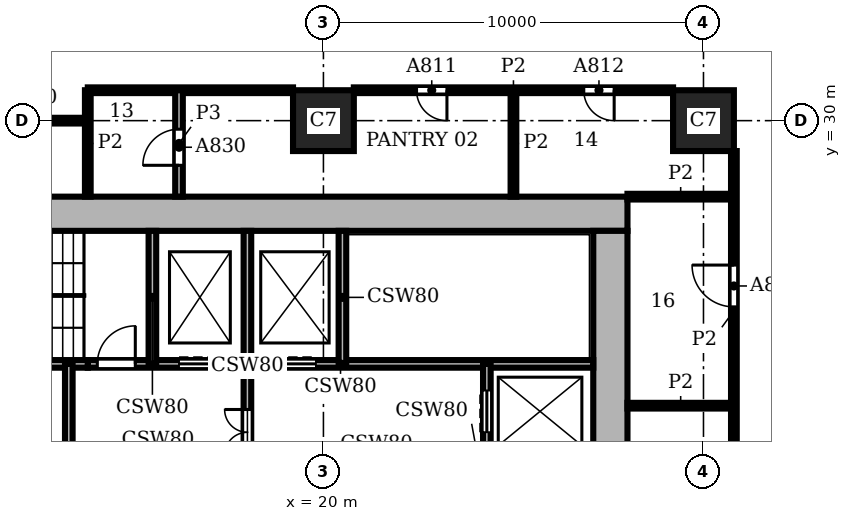
"""IFC4 building model, lengths in metres.
Left out: names, types, materials, properties, quantities, classifications, styles, units other than length and angle.
Written with IfcOpenShell. Run it as: python <this file> out.ifc"""

import sys

from ifc_helpers import new_model, si_unit, direction, frame, frame_2d, origin, origin_2d, place, context, subcontext, project, spatial, rectangle, extrude, element, fill, save


model = new_model("IFC4")
c1 = context("Model", 3, precision=1e-05, world=origin(), true_north=direction((0.0, 1.0)))
c2 = subcontext(c1, "Body", "Model", "MODEL_VIEW")
j1 = project(units=[si_unit("LENGTHUNIT", "METRE"), si_unit("PLANEANGLEUNIT", "RADIAN")], contexts=[c1])
p1 = place(None, origin())
s1 = spatial("IfcSite", under=j1, at=p1, CompositionType="ELEMENT")
p2 = place(p1, origin())
s2 = spatial("IfcBuilding", under=s1, at=p2, CompositionType="ELEMENT")
p3 = place(p2, frame((0.0, 0.0, 93.9)))
s3 = spatial("IfcBuildingStorey", under=s2, at=p3, CompositionType="ELEMENT", Elevation=93.9)
for number, where, z_axis, x_axis in (
    (1, (20.0, 30.0, 0.0), (0.0, 0.0, 1.0), (1.0, 0.0, 0.0)),
    (2, (30.0, 30.0, 0.0), (0.0, 0.0, 1.0), (1.0, 0.0, 0.0)),
):
    element("IfcColumn", number, at=place(p3, frame(where, z_axis=z_axis, x_axis=x_axis)), inside=s3, PredefinedType="COLUMN", context=c2, shape_type="SweptSolid", body=[
        extrude(rectangle(XDim=1.6, YDim=1.6, at=origin_2d()), origin(), (0.0, 0.0, 1.0), 3.9),
    ])
p4 = place(p3, frame((27.55, 8.9, 0.0), z_axis=(0.0, 0.0, 1.0), x_axis=(0.0, 1.0, 0.0)))
e3 = element("IfcWall", 3, at=p4, inside=s3, PredefinedType="SHEAR", context=c2, shape_type="SweptSolid", body=[
    extrude(rectangle(XDim=18.2, YDim=0.9, at=frame_2d((9.1, 0.0))), origin(), (0.0, 0.0, 1.0), 3.9),
])
p5 = place(p4, frame((4.55, 0.0, 0.0)))
e4 = element("IfcOpeningElement", 4, at=p5, cuts=e3, PredefinedType="OPENING", context=c2, shape_type="SweptSolid", body=[
    extrude(rectangle(XDim=1.6, YDim=2.1, at=frame_2d((0.8, 1.05))), frame((0.0, 0.46, 0.0), z_axis=(0.0, -1.0, 0.0), x_axis=(1.0, 0.0, 0.0)), (0.0, 0.0, 1.0), 0.92),
])
p6 = place(p3, frame((28.0, 27.55, 0.0), z_axis=(0.0, 0.0, 1.0), x_axis=(-1.0, 0.0, 0.0)))
e5 = element("IfcWall", 5, at=p6, inside=s3, PredefinedType="SHEAR", context=c2, shape_type="SweptSolid", body=[
    extrude(rectangle(XDim=20.0, YDim=0.9, at=frame_2d((10.0, 0.0))), origin(), (0.0, 0.0, 1.0), 3.9),
])
p7 = place(p3, frame((8.9, 23.6, 0.0), z_axis=(0.0, 0.0, 1.0), x_axis=(1.0, 0.0, 0.0)))
e6 = element("IfcWall", 6, at=p7, inside=s3, PredefinedType="SHEAR", context=c2, shape_type="SweptSolid", body=[
    extrude(rectangle(XDim=4.9, YDim=0.2, at=frame_2d((2.45, 0.0))), origin(), (0.0, 0.0, 1.0), 3.58),
])
p8 = place(p3, frame((13.8, 23.6, 0.0), z_axis=(0.0, 0.0, 1.0), x_axis=(1.0, 0.0, 0.0)))
e7 = element("IfcWall", 7, at=p8, inside=s3, PredefinedType="SHEAR", context=c2, shape_type="SweptSolid", body=[
    extrude(rectangle(XDim=13.3, YDim=0.2, at=frame_2d((6.65, 0.0))), origin(), (0.0, 0.0, 1.0), 3.58),
])
p9 = place(p8, frame((2.4, 0.0, 0.0)))
e8 = element("IfcOpeningElement", 8, at=p9, cuts=e7, PredefinedType="OPENING", context=c2, shape_type="SweptSolid", body=[
    extrude(rectangle(XDim=1.1, YDim=2.1, at=frame_2d((0.55, 1.05))), frame((0.0, 0.11, 0.0), z_axis=(0.0, -1.0, 0.0), x_axis=(1.0, 0.0, 0.0)), (0.0, 0.0, 1.0), 0.22),
])
p10 = place(p8, frame((4.9, 0.0, 0.0)))
e9 = element("IfcOpeningElement", 9, at=p10, cuts=e7, PredefinedType="OPENING", context=c2, shape_type="SweptSolid", body=[
    extrude(rectangle(XDim=1.1, YDim=2.1, at=frame_2d((0.55, 1.05))), frame((0.0, 0.11, 0.0), z_axis=(0.0, -1.0, 0.0), x_axis=(1.0, 0.0, 0.0)), (0.0, 0.0, 1.0), 0.22),
])
p11 = place(p8, frame((0.25, 0.0, 0.0)))
e10 = element("IfcOpeningElement", 10, at=p11, cuts=e7, PredefinedType="OPENING", context=c2, shape_type="SweptSolid", body=[
    extrude(rectangle(XDim=1.0, YDim=2.1, at=frame_2d((0.5, 1.05))), frame((0.0, 0.11, 0.0), z_axis=(0.0, -1.0, 0.0), x_axis=(1.0, 0.0, 0.0)), (0.0, 0.0, 1.0), 0.22),
])
p12 = place(p3, frame((13.3, 20.0, 0.0), z_axis=(0.0, 0.0, 1.0), x_axis=(0.0, 1.0, 0.0)))
e11 = element("IfcWall", 11, at=p12, inside=s3, PredefinedType="SHEAR", context=c2, shape_type="SweptSolid", body=[
    extrude(rectangle(XDim=3.6, YDim=0.2, at=frame_2d((1.8, 0.0))), origin(), (0.0, 0.0, 1.0), 3.58),
])
p13 = place(p3, frame((15.5, 23.6, 0.0), z_axis=(0.0, 0.0, 1.0), x_axis=(0.0, 1.0, 0.0)))
e12 = element("IfcWall", 12, at=p13, inside=s3, PredefinedType="SHEAR", context=c2, shape_type="SweptSolid", body=[
    extrude(rectangle(XDim=3.5, YDim=0.2, at=frame_2d((1.75, 0.0))), origin(), (0.0, 0.0, 1.0), 3.58),
])
p14 = place(p3, frame((18.0, 20.0, 0.0), z_axis=(0.0, 0.0, 1.0), x_axis=(0.0, 1.0, 0.0)))
e13 = element("IfcWall", 13, at=p14, inside=s3, PredefinedType="SHEAR", context=c2, shape_type="SweptSolid", body=[
    extrude(rectangle(XDim=7.1, YDim=0.2, at=frame_2d((3.55, 0.0))), origin(), (0.0, 0.0, 1.0), 3.58),
])
p15 = place(p14, frame((1.2, 0.0, 0.0)))
e14 = element("IfcOpeningElement", 14, at=p15, cuts=e13, PredefinedType="OPENING", context=c2, shape_type="SweptSolid", body=[
    extrude(rectangle(XDim=1.2, YDim=2.1, at=frame_2d((0.6, 1.05))), frame((0.0, 0.11, 0.0), z_axis=(0.0, -1.0, 0.0), x_axis=(1.0, 0.0, 0.0)), (0.0, 0.0, 1.0), 0.22),
])
p16 = place(p3, frame((20.5, 23.6, 0.0), z_axis=(0.0, 0.0, 1.0), x_axis=(0.0, 1.0, 0.0)))
e15 = element("IfcWall", 15, at=p16, inside=s3, PredefinedType="SHEAR", context=c2, shape_type="SweptSolid", body=[
    extrude(rectangle(XDim=3.5, YDim=0.2, at=frame_2d((1.75, 0.0))), origin(), (0.0, 0.0, 1.0), 3.58),
])
p17 = place(p3, frame((24.3, 16.1, 0.0), z_axis=(0.0, 0.0, 1.0), x_axis=(0.0, 1.0, 0.0)))
e16 = element("IfcWall", 16, at=p17, inside=s3, PredefinedType="SHEAR", context=c2, shape_type="SweptSolid", body=[
    extrude(rectangle(XDim=7.5, YDim=0.2, at=frame_2d((3.75, 0.0))), origin(), (0.0, 0.0, 1.0), 3.58),
])
p18 = place(p17, frame((5.7, 0.0, 0.0)))
e17 = element("IfcOpeningElement", 17, at=p18, cuts=e16, PredefinedType="OPENING", context=c2, shape_type="SweptSolid", body=[
    extrude(rectangle(XDim=1.1, YDim=2.1, at=frame_2d((0.55, 1.05))), frame((0.0, 0.11, 0.0), z_axis=(0.0, -1.0, 0.0), x_axis=(1.0, 0.0, 0.0)), (0.0, 0.0, 1.0), 0.22),
])
for number, where, z_axis, x_axis in (
    (18, (13.8, 28.0, 0.0), (0.0, 0.0, 1.0), (0.0, 1.0, 0.0)),
    (19, (25.0, 28.0, 0.0), (0.0, 0.0, 1.0), (0.0, 1.0, 0.0)),
):
    element("IfcWall", number, at=place(p3, frame(where, z_axis=z_axis, x_axis=x_axis)), inside=s3, PredefinedType="PARTITIONING", context=c2, shape_type="SweptSolid", body=[
        extrude(rectangle(XDim=2.8, YDim=0.15, at=frame_2d((1.4, 0.0))), origin(), (0.0, 0.0, 1.0), 3.58),
    ])
p19 = place(p3, frame((30.8, 20.8, 0.0), z_axis=(0.0, 0.0, 1.0), x_axis=(0.0, 1.0, 0.0)))
e20 = element("IfcWall", 20, at=p19, inside=s3, PredefinedType="PARTITIONING", context=c2, shape_type="SweptSolid", body=[
    extrude(rectangle(XDim=8.4, YDim=0.15, at=frame_2d((4.2, 0.0))), origin(), (0.0, 0.0, 1.0), 3.58),
])
p20 = place(p19, frame((4.3, 0.0, 0.0)))
e21 = element("IfcOpeningElement", 21, at=p20, cuts=e20, PredefinedType="OPENING", context=c2, shape_type="SweptSolid", body=[
    extrude(rectangle(XDim=1.1, YDim=2.1, at=frame_2d((0.55, 1.05))), frame((0.0, 0.085, 0.0), z_axis=(0.0, -1.0, 0.0), x_axis=(1.0, 0.0, 0.0)), (0.0, 0.0, 1.0), 0.17),
])
for number, where, z_axis, x_axis in (
    (22, (28.0, 22.5, 0.0), (0.0, 0.0, 1.0), (1.0, 0.0, 0.0)),
    (23, (28.0, 28.0, 0.0), (0.0, 0.0, 1.0), (1.0, 0.0, 0.0)),
):
    element("IfcWall", number, at=place(p3, frame(where, z_axis=z_axis, x_axis=x_axis)), inside=s3, PredefinedType="PARTITIONING", context=c2, shape_type="SweptSolid", body=[
        extrude(rectangle(XDim=2.8, YDim=0.15, at=frame_2d((1.4, 0.0))), origin(), (0.0, 0.0, 1.0), 3.58),
    ])
p21 = place(p3, frame((10.8, 30.0, 0.0), z_axis=(0.0, 0.0, 1.0), x_axis=(1.0, 0.0, 0.0)))
e24 = element("IfcWall", 24, at=p21, inside=s3, PredefinedType="PARTITIONING", context=c2, shape_type="SweptSolid", body=[
    extrude(rectangle(XDim=3.0, YDim=0.15, at=frame_2d((1.5, 0.0))), origin(), (0.0, 0.0, 1.0), 3.58),
])
p22 = place(p21, frame((1.15, 0.0, 0.0)))
e25 = element("IfcOpeningElement", 25, at=p22, cuts=e24, PredefinedType="OPENING", context=c2, shape_type="SweptSolid", body=[
    extrude(rectangle(XDim=0.8, YDim=2.1, at=frame_2d((0.4, 1.05))), frame((0.0, 0.085, 0.0), z_axis=(0.0, -1.0, 0.0), x_axis=(1.0, 0.0, 0.0)), (0.0, 0.0, 1.0), 0.17),
])
p23 = place(p3, frame((13.8, 30.8, 0.0), z_axis=(0.0, 0.0, 1.0), x_axis=(1.0, 0.0, 0.0)))
e26 = element("IfcWall", 26, at=p23, inside=s3, PredefinedType="PARTITIONING", context=c2, shape_type="SweptSolid", body=[
    extrude(rectangle(XDim=5.4, YDim=0.15, at=frame_2d((2.7, 0.0))), origin(), (0.0, 0.0, 1.0), 3.58),
])
p24 = place(p3, frame((20.8, 30.8, 0.0), z_axis=(0.0, 0.0, 1.0), x_axis=(1.0, 0.0, 0.0)))
e27 = element("IfcWall", 27, at=p24, inside=s3, PredefinedType="PARTITIONING", context=c2, shape_type="SweptSolid", body=[
    extrude(rectangle(XDim=8.4, YDim=0.15, at=frame_2d((4.2, 0.0))), origin(), (0.0, 0.0, 1.0), 3.58),
])
p25 = place(p24, frame((1.65, 0.0, 0.0)))
e28 = element("IfcOpeningElement", 28, at=p25, cuts=e27, PredefinedType="OPENING", context=c2, shape_type="SweptSolid", body=[
    extrude(rectangle(XDim=0.8, YDim=2.1, at=frame_2d((0.4, 1.05))), frame((0.0, 0.085, 0.0), z_axis=(0.0, -1.0, 0.0), x_axis=(1.0, 0.0, 0.0)), (0.0, 0.0, 1.0), 0.17),
])
p26 = place(p24, frame((6.05, 0.0, 0.0)))
e29 = element("IfcOpeningElement", 29, at=p26, cuts=e27, PredefinedType="OPENING", context=c2, shape_type="SweptSolid", body=[
    extrude(rectangle(XDim=0.8, YDim=2.1, at=frame_2d((0.4, 1.05))), frame((0.0, 0.085, 0.0), z_axis=(0.0, -1.0, 0.0), x_axis=(1.0, 0.0, 0.0)), (0.0, 0.0, 1.0), 0.17),
])
p27 = place(p3, frame((16.2, 28.0, 0.0), z_axis=(0.0, 0.0, 1.0), x_axis=(0.0, 1.0, 0.0)))
e30 = element("IfcWall", 30, at=p27, inside=s3, PredefinedType="PARTITIONING", context=c2, shape_type="SweptSolid", body=[
    extrude(rectangle(XDim=2.8, YDim=0.2, at=frame_2d((1.4, 0.0))), origin(), (0.0, 0.0, 1.0), 3.58),
])
p28 = place(p27, frame((0.825, 0.0, 0.0)))
e31 = element("IfcOpeningElement", 31, at=p28, cuts=e30, PredefinedType="OPENING", context=c2, shape_type="SweptSolid", body=[
    extrude(rectangle(XDim=0.95, YDim=2.1, at=frame_2d((0.475, 1.05))), frame((0.0, 0.11, 0.0), z_axis=(0.0, -1.0, 0.0), x_axis=(1.0, 0.0, 0.0)), (0.0, 0.0, 1.0), 0.22),
])
p29 = place(p18, origin())
e32 = element("IfcDoor", 32, at=p29, inside=s3, OperationType="DOUBLE_DOOR_SLIDING", PredefinedType="DOOR", context=c2, shape_type="SweptSolid", body=[
    extrude(rectangle(XDim=1.1, YDim=2.1, at=frame_2d((0.55, 1.05))), frame((0.0, 0.025, 0.0), z_axis=(0.0, -1.0, 0.0), x_axis=(1.0, 0.0, 0.0)), (0.0, 0.0, 1.0), 0.05),
])
fill(e17, e32)
p30 = place(p9, origin())
e33 = element("IfcDoor", 33, at=p30, inside=s3, OperationType="DOUBLE_DOOR_SLIDING", PredefinedType="DOOR", context=c2, shape_type="SweptSolid", body=[
    extrude(rectangle(XDim=1.1, YDim=2.1, at=frame_2d((0.55, 1.05))), frame((0.0, 0.025, 0.0), z_axis=(0.0, -1.0, 0.0), x_axis=(1.0, 0.0, 0.0)), (0.0, 0.0, 1.0), 0.05),
])
fill(e8, e33)
p31 = place(p10, origin())
e34 = element("IfcDoor", 34, at=p31, inside=s3, OperationType="DOUBLE_DOOR_SLIDING", PredefinedType="DOOR", context=c2, shape_type="SweptSolid", body=[
    extrude(rectangle(XDim=1.1, YDim=2.1, at=frame_2d((0.55, 1.05))), frame((0.0, 0.025, 0.0), z_axis=(0.0, -1.0, 0.0), x_axis=(1.0, 0.0, 0.0)), (0.0, 0.0, 1.0), 0.05),
])
fill(e9, e34)
p32 = place(p11, origin())
e35 = element("IfcDoor", 35, at=p32, inside=s3, OperationType="SINGLE_SWING_RIGHT", PredefinedType="DOOR", context=c2, shape_type="SweptSolid", body=[
    extrude(rectangle(XDim=1.0, YDim=2.1, at=frame_2d((0.5, 1.05))), frame((0.0, 0.025, 0.0), z_axis=(0.0, -1.0, 0.0), x_axis=(1.0, 0.0, 0.0)), (0.0, 0.0, 1.0), 0.05),
])
fill(e10, e35)
p33 = place(p15, origin())
e36 = element("IfcDoor", 36, at=p33, inside=s3, OperationType="DOUBLE_DOOR_SINGLE_SWING", PredefinedType="DOOR", context=c2, shape_type="SweptSolid", body=[
    extrude(rectangle(XDim=1.2, YDim=2.1, at=frame_2d((0.6, 1.05))), frame((0.0, 0.025, 0.0), z_axis=(0.0, -1.0, 0.0), x_axis=(1.0, 0.0, 0.0)), (0.0, 0.0, 1.0), 0.05),
])
fill(e14, e36)
p34 = place(p20, origin())
e37 = element("IfcDoor", 37, at=p34, inside=s3, OperationType="SINGLE_SWING_RIGHT", PredefinedType="DOOR", context=c2, shape_type="SweptSolid", body=[
    extrude(rectangle(XDim=1.1, YDim=2.1, at=frame_2d((0.55, 1.05))), frame((0.0, 0.025, 0.0), z_axis=(0.0, -1.0, 0.0), x_axis=(1.0, 0.0, 0.0)), (0.0, 0.0, 1.0), 0.05),
])
fill(e21, e37)
p35 = place(p25, frame((0.8, 0.0, 0.0), z_axis=(0.0, 0.0, 1.0), x_axis=(-1.0, 0.0, 0.0)))
e38 = element("IfcDoor", 38, at=p35, inside=s3, OperationType="SINGLE_SWING_LEFT", PredefinedType="DOOR", context=c2, shape_type="SweptSolid", body=[
    extrude(rectangle(XDim=0.8, YDim=2.1, at=frame_2d((0.4, 1.05))), frame((0.0, 0.025, 0.0), z_axis=(0.0, -1.0, 0.0), x_axis=(1.0, 0.0, 0.0)), (0.0, 0.0, 1.0), 0.05),
])
fill(e28, e38)
p36 = place(p26, frame((0.8, 0.0, 0.0), z_axis=(0.0, 0.0, 1.0), x_axis=(-1.0, 0.0, 0.0)))
e39 = element("IfcDoor", 39, at=p36, inside=s3, OperationType="SINGLE_SWING_LEFT", PredefinedType="DOOR", context=c2, shape_type="SweptSolid", body=[
    extrude(rectangle(XDim=0.8, YDim=2.1, at=frame_2d((0.4, 1.05))), frame((0.0, 0.025, 0.0), z_axis=(0.0, -1.0, 0.0), x_axis=(1.0, 0.0, 0.0)), (0.0, 0.0, 1.0), 0.05),
])
fill(e29, e39)
p37 = place(p28, origin())
e40 = element("IfcDoor", 40, at=p37, inside=s3, OperationType="SINGLE_SWING_LEFT", PredefinedType="DOOR", context=c2, shape_type="SweptSolid", body=[
    extrude(rectangle(XDim=0.95, YDim=2.1, at=frame_2d((0.475, 1.05))), frame((0.0, 0.025, 0.0), z_axis=(0.0, -1.0, 0.0), x_axis=(1.0, 0.0, 0.0)), (0.0, 0.0, 1.0), 0.05),
])
fill(e31, e40)
save(model, sys.argv[1])
